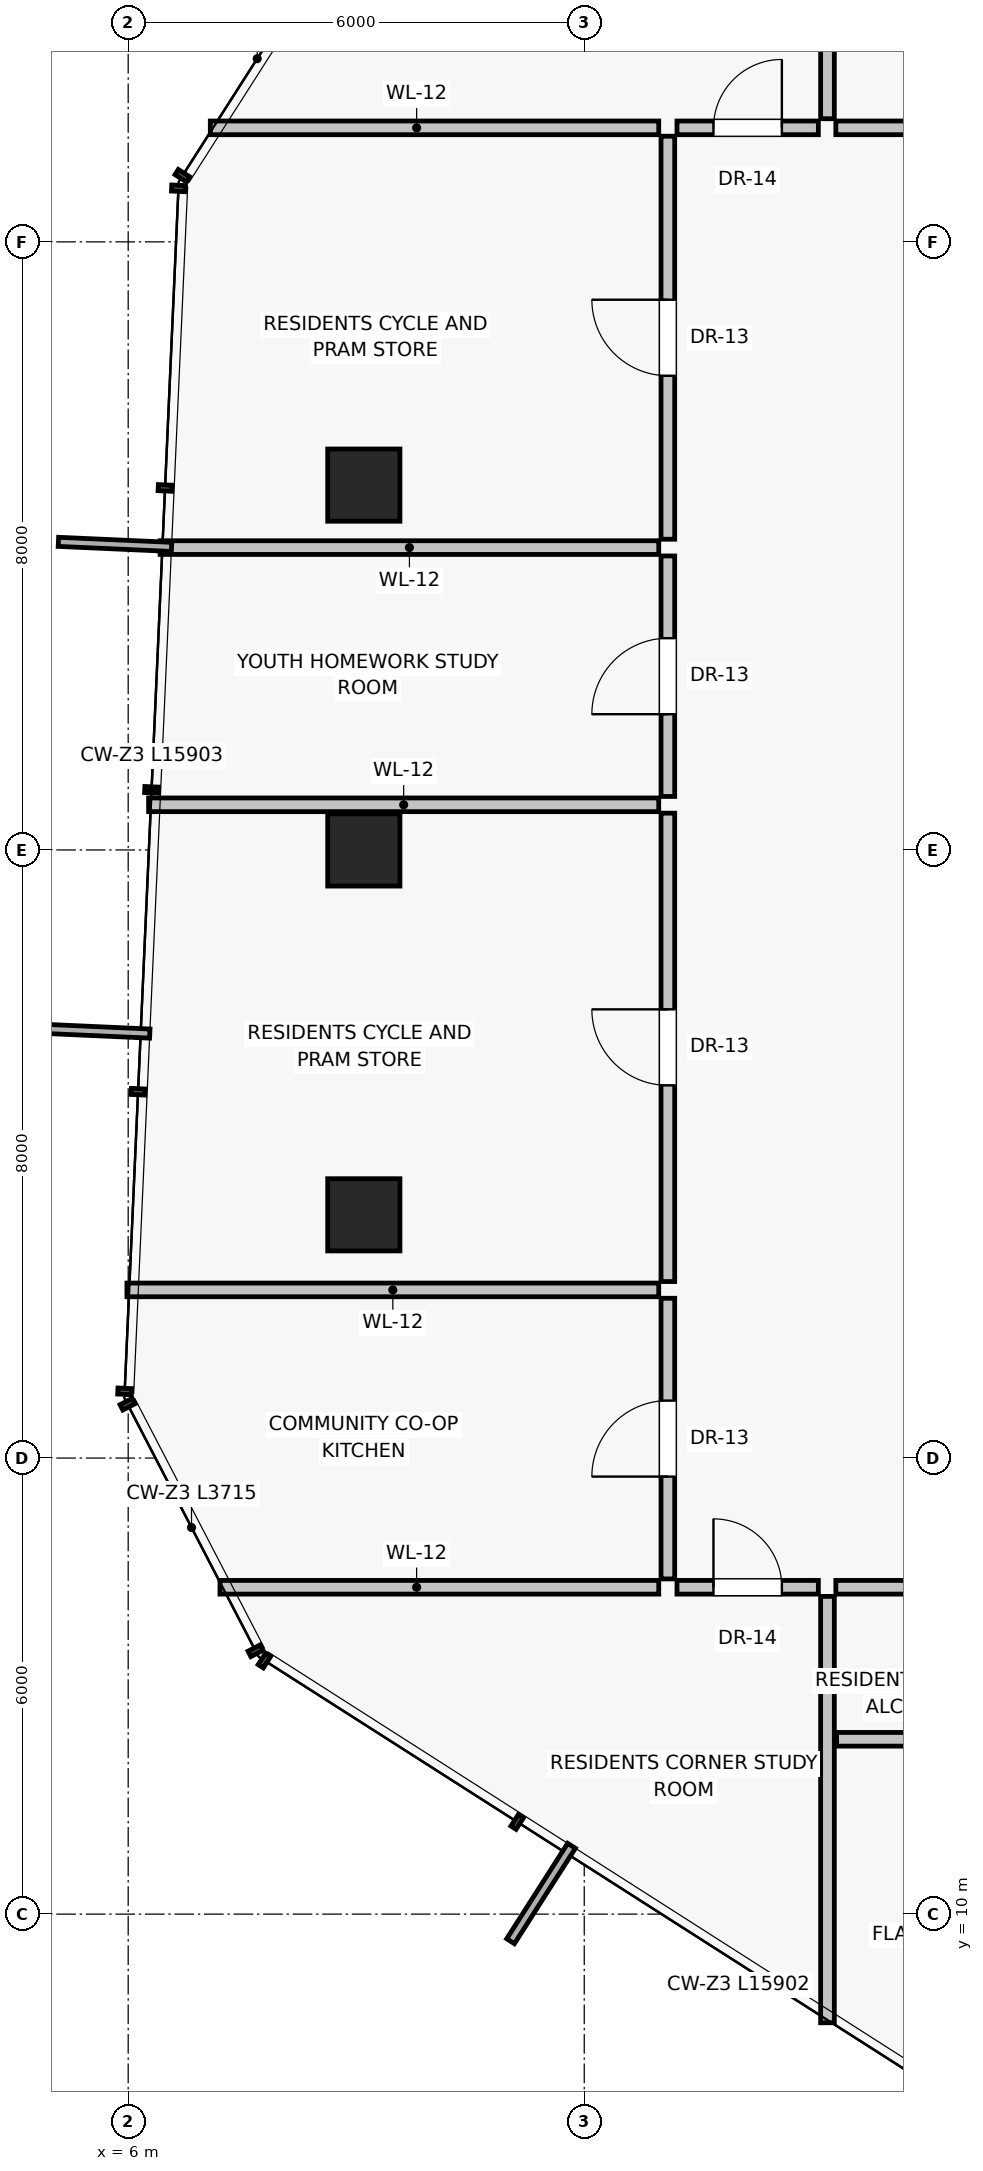
"""IFC4 building model, lengths in metres.
Left out: names, types, materials, properties, quantities, classifications, styles, units other than length and angle.
Written with IfcOpenShell. Run it as: python <this file> out.ifc"""

import sys

from ifc_helpers import new_model, si_unit, direction, frame, frame_2d, origin, origin_2d, place, context, subcontext, project, spatial, rectangle, extrude, source, transform, mapped, element, fill, save


model = new_model("IFC4")
c1 = context("Model", 3, precision=1e-05, world=origin(), true_north=direction((0.0, 1.0)))
c2 = subcontext(c1, "Body", "Model", "MODEL_VIEW")
j1 = project(units=[si_unit("LENGTHUNIT", "METRE"), si_unit("PLANEANGLEUNIT", "RADIAN")], contexts=[c1])
p1 = place(None, origin())
s1 = spatial("IfcSite", under=j1, at=p1, CompositionType="ELEMENT")
p2 = place(p1, origin())
s2 = spatial("IfcBuilding", under=s1, at=p2, CompositionType="ELEMENT")
p3 = place(p2, frame((0.0, 0.0, 215.65)))
s3 = spatial("IfcBuildingStorey", under=s2, at=p3, CompositionType="ELEMENT", Elevation=215.65)
for number, where, z_axis, x_axis in (
    (1, (9.1, 28.8, 0.0), (0.0, 0.0, 1.0), (1.0, 0.0, 0.0)),
    (2, (9.1, 24.0, 0.0), (0.0, 0.0, 1.0), (1.0, 0.0, 0.0)),
    (3, (9.1, 19.2, 0.0), (0.0, 0.0, 1.0), (1.0, 0.0, 0.0)),
):
    element("IfcColumn", number, at=place(p3, frame(where, z_axis=z_axis, x_axis=x_axis)), inside=s3, PredefinedType="COLUMN", context=c2, shape_type="SweptSolid", body=[
        extrude(rectangle(XDim=0.95, YDim=0.95, at=origin_2d()), origin(), (0.0, 0.0, 1.0), 3.25),
    ])
p4 = place(p3, frame((15.2, 14.18, 0.0), z_axis=(0.0, 0.0, 1.0), x_axis=(0.0, -1.0, 0.0)))
e4 = element("IfcWall", 4, at=p4, inside=s3, PredefinedType="PARTITIONING", context=c2, shape_type="SweptSolid", body=[
    extrude(rectangle(XDim=5.609, YDim=0.18, at=frame_2d((2.805, 0.0))), origin(), (0.0, 0.0, 1.0), 3.015),
])
p5 = place(p3, frame((15.31, 14.3, 0.0), z_axis=(0.0, 0.0, 1.0), x_axis=(1.0, 0.0, 0.0)))
e5 = element("IfcWall", 5, at=p5, inside=s3, PredefinedType="PARTITIONING", context=c2, shape_type="SweptSolid", body=[
    extrude(rectangle(XDim=3.78, YDim=0.18, at=frame_2d((1.89, 0.0))), origin(), (0.0, 0.0, 1.0), 3.015),
])
p6 = place(p5, frame((1.39, 0.0, 0.0)))
e6 = element("IfcOpeningElement", 6, at=p6, cuts=e5, PredefinedType="OPENING", context=c2, shape_type="SweptSolid", body=[
    extrude(rectangle(XDim=1.0, YDim=2.01, at=frame_2d((0.5, 1.005))), frame((0.0, 0.1, 0.0), z_axis=(0.0, -1.0, 0.0), x_axis=(1.0, 0.0, 0.0)), (0.0, 0.0, 1.0), 0.2),
])
p7 = place(p3, frame((15.32, 12.3, 0.0), z_axis=(0.0, 0.0, 1.0), x_axis=(1.0, 0.0, 0.0)))
e7 = element("IfcWall", 7, at=p7, inside=s3, PredefinedType="PARTITIONING", context=c2, shape_type="SweptSolid", body=[
    extrude(rectangle(XDim=3.78, YDim=0.18, at=frame_2d((1.89, 0.0))), origin(), (0.0, 0.0, 1.0), 3.015),
])
p8 = place(p3, frame((15.2, 33.62, 0.0), z_axis=(0.0, 0.0, 1.0), x_axis=(0.0, 1.0, 0.0)))
e8 = element("IfcWall", 8, at=p8, inside=s3, PredefinedType="PARTITIONING", context=c2, shape_type="SweptSolid", body=[
    extrude(rectangle(XDim=5.8, YDim=0.18, at=frame_2d((2.9, 0.0))), origin(), (0.0, 0.0, 1.0), 3.015),
])
p9 = place(p3, frame((15.31, 33.5, 0.0), z_axis=(0.0, 0.0, 1.0), x_axis=(1.0, 0.0, 0.0)))
e9 = element("IfcWall", 9, at=p9, inside=s3, PredefinedType="PARTITIONING", context=c2, shape_type="SweptSolid", body=[
    extrude(rectangle(XDim=3.78, YDim=0.18, at=frame_2d((1.89, 0.0))), origin(), (0.0, 0.0, 1.0), 3.015),
])
p10 = place(p9, frame((1.39, 0.0, 0.0)))
e10 = element("IfcOpeningElement", 10, at=p10, cuts=e9, PredefinedType="OPENING", context=c2, shape_type="SweptSolid", body=[
    extrude(rectangle(XDim=1.0, YDim=2.01, at=frame_2d((0.5, 1.005))), frame((0.0, 0.1, 0.0), z_axis=(0.0, -1.0, 0.0), x_axis=(1.0, 0.0, 0.0)), (0.0, 0.0, 1.0), 0.2),
])
p11 = place(p3, frame((12.98, 14.3, 0.0), z_axis=(0.0, 0.0, 1.0), x_axis=(-1.0, 0.0, 0.0)))
e11 = element("IfcWall", 11, at=p11, inside=s3, PredefinedType="PARTITIONING", context=c2, shape_type="SweptSolid", body=[
    extrude(rectangle(XDim=5.772, YDim=0.18, at=frame_2d((2.886, 0.0))), origin(), (0.0, 0.0, 1.0), 3.015),
])
p12 = place(p3, frame((12.98, 33.5, 0.0), z_axis=(0.0, 0.0, 1.0), x_axis=(-1.0, 0.0, 0.0)))
e12 = element("IfcWall", 12, at=p12, inside=s3, PredefinedType="PARTITIONING", context=c2, shape_type="SweptSolid", body=[
    extrude(rectangle(XDim=5.9, YDim=0.18, at=frame_2d((2.95, 0.0))), origin(), (0.0, 0.0, 1.0), 3.015),
])
p13 = place(p3, frame((13.1, 14.41, 0.0), z_axis=(0.0, 0.0, 1.0), x_axis=(0.0, 1.0, 0.0)))
e13 = element("IfcWall", 13, at=p13, inside=s3, PredefinedType="PARTITIONING", context=c2, shape_type="SweptSolid", body=[
    extrude(rectangle(XDim=3.692, YDim=0.18, at=frame_2d((1.846, 0.0))), origin(), (0.0, 0.0, 1.0), 2.662),
])
p14 = place(p13, frame((1.346, 0.0, 0.0)))
e14 = element("IfcOpeningElement", 14, at=p14, cuts=e13, PredefinedType="OPENING", context=c2, shape_type="SweptSolid", body=[
    extrude(rectangle(XDim=1.0, YDim=2.01, at=frame_2d((0.5, 1.005))), frame((0.0, 0.1, 0.0), z_axis=(0.0, -1.0, 0.0), x_axis=(1.0, 0.0, 0.0)), (0.0, 0.0, 1.0), 0.2),
])
p15 = place(p3, frame((13.1, 18.322, 0.0), z_axis=(0.0, 0.0, 1.0), x_axis=(0.0, 1.0, 0.0)))
e15 = element("IfcWall", 15, at=p15, inside=s3, PredefinedType="PARTITIONING", context=c2, shape_type="SweptSolid", body=[
    extrude(rectangle(XDim=6.162, YDim=0.18, at=frame_2d((3.081, 0.0))), origin(), (0.0, 0.0, 1.0), 2.662),
])
p16 = place(p15, frame((2.581, 0.0, 0.0)))
e16 = element("IfcOpeningElement", 16, at=p16, cuts=e15, PredefinedType="OPENING", context=c2, shape_type="SweptSolid", body=[
    extrude(rectangle(XDim=1.0, YDim=2.01, at=frame_2d((0.5, 1.005))), frame((0.0, 0.1, 0.0), z_axis=(0.0, -1.0, 0.0), x_axis=(1.0, 0.0, 0.0)), (0.0, 0.0, 1.0), 0.2),
])
p17 = place(p3, frame((12.98, 18.212, 0.0), z_axis=(0.0, 0.0, 1.0), x_axis=(-1.0, 0.0, 0.0)))
e17 = element("IfcWall", 17, at=p17, inside=s3, PredefinedType="PARTITIONING", context=c2, shape_type="SweptSolid", body=[
    extrude(rectangle(XDim=6.997, YDim=0.18, at=frame_2d((3.498, 0.0))), origin(), (0.0, 0.0, 1.0), 2.469),
])
p18 = place(p3, frame((12.98, 24.594, 0.0), z_axis=(0.0, 0.0, 1.0), x_axis=(-1.0, 0.0, 0.0)))
e18 = element("IfcWall", 18, at=p18, inside=s3, PredefinedType="PARTITIONING", context=c2, shape_type="SweptSolid", body=[
    extrude(rectangle(XDim=6.711, YDim=0.18, at=frame_2d((3.356, 0.0))), origin(), (0.0, 0.0, 1.0), 3.015),
])
p19 = place(p3, frame((13.1, 24.704, 0.0), z_axis=(0.0, 0.0, 1.0), x_axis=(0.0, 1.0, 0.0)))
e19 = element("IfcWall", 19, at=p19, inside=s3, PredefinedType="PARTITIONING", context=c2, shape_type="SweptSolid", body=[
    extrude(rectangle(XDim=3.164, YDim=0.18, at=frame_2d((1.582, 0.0))), origin(), (0.0, 0.0, 1.0), 2.662),
])
p20 = place(p19, frame((1.082, 0.0, 0.0)))
e20 = element("IfcOpeningElement", 20, at=p20, cuts=e19, PredefinedType="OPENING", context=c2, shape_type="SweptSolid", body=[
    extrude(rectangle(XDim=1.0, YDim=2.01, at=frame_2d((0.5, 1.005))), frame((0.0, 0.1, 0.0), z_axis=(0.0, -1.0, 0.0), x_axis=(1.0, 0.0, 0.0)), (0.0, 0.0, 1.0), 0.2),
])
p21 = place(p3, frame((13.1, 28.088, 0.0), z_axis=(0.0, 0.0, 1.0), x_axis=(0.0, 1.0, 0.0)))
e21 = element("IfcWall", 21, at=p21, inside=s3, PredefinedType="PARTITIONING", context=c2, shape_type="SweptSolid", body=[
    extrude(rectangle(XDim=5.302, YDim=0.18, at=frame_2d((2.651, 0.0))), origin(), (0.0, 0.0, 1.0), 2.662),
])
p22 = place(p21, frame((2.151, 0.0, 0.0)))
e22 = element("IfcOpeningElement", 22, at=p22, cuts=e21, PredefinedType="OPENING", context=c2, shape_type="SweptSolid", body=[
    extrude(rectangle(XDim=1.0, YDim=2.01, at=frame_2d((0.5, 1.005))), frame((0.0, 0.1, 0.0), z_axis=(0.0, -1.0, 0.0), x_axis=(1.0, 0.0, 0.0)), (0.0, 0.0, 1.0), 0.2),
])
p23 = place(p3, frame((12.98, 27.978, 0.0), z_axis=(0.0, 0.0, 1.0), x_axis=(-1.0, 0.0, 0.0)))
e23 = element("IfcWall", 23, at=p23, inside=s3, PredefinedType="PARTITIONING", context=c2, shape_type="SweptSolid", body=[
    extrude(rectangle(XDim=6.56, YDim=0.18, at=frame_2d((3.28, 0.0))), origin(), (0.0, 0.0, 1.0), 3.015),
])
p24 = place(p3, frame((13.22, 14.3, 0.0), z_axis=(0.0, 0.0, 1.0), x_axis=(1.0, 0.0, 0.0)))
e24 = element("IfcWall", 24, at=p24, inside=s3, PredefinedType="PARTITIONING", context=c2, shape_type="SweptSolid", body=[
    extrude(rectangle(XDim=1.86, YDim=0.18, at=frame_2d((0.93, 0.0))), origin(), (0.0, 0.0, 1.0), 3.015),
])
p25 = place(p24, frame((0.48, 0.0, 0.0)))
e25 = element("IfcOpeningElement", 25, at=p25, cuts=e24, PredefinedType="OPENING", context=c2, shape_type="SweptSolid", body=[
    extrude(rectangle(XDim=0.9, YDim=2.01, at=frame_2d((0.45, 1.005))), frame((0.0, 0.1, 0.0), z_axis=(0.0, -1.0, 0.0), x_axis=(1.0, 0.0, 0.0)), (0.0, 0.0, 1.0), 0.2),
])
p26 = place(p3, frame((13.22, 33.5, 0.0), z_axis=(0.0, 0.0, 1.0), x_axis=(1.0, 0.0, 0.0)))
e26 = element("IfcWall", 26, at=p26, inside=s3, PredefinedType="PARTITIONING", context=c2, shape_type="SweptSolid", body=[
    extrude(rectangle(XDim=1.86, YDim=0.18, at=frame_2d((0.93, 0.0))), origin(), (0.0, 0.0, 1.0), 3.015),
])
p27 = place(p26, frame((0.48, 0.0, 0.0)))
e27 = element("IfcOpeningElement", 27, at=p27, cuts=e26, PredefinedType="OPENING", context=c2, shape_type="SweptSolid", body=[
    extrude(rectangle(XDim=0.9, YDim=2.01, at=frame_2d((0.45, 1.005))), frame((0.0, 0.1, 0.0), z_axis=(0.0, -1.0, 0.0), x_axis=(1.0, 0.0, 0.0)), (0.0, 0.0, 1.0), 0.2),
])
m1 = source(origin(), c2, "Body", "SweptSolid", [
    extrude(rectangle(XDim=1.0, YDim=2.01, at=frame_2d((0.5, 1.005))), frame((0.0, 0.025, 0.0), z_axis=(0.0, -1.0, 0.0), x_axis=(1.0, 0.0, 0.0)), (0.0, 0.0, 1.0), 0.05),
])
p28 = place(p14, origin())
e28 = element("IfcDoor", 28, at=p28, inside=s3, OperationType="SINGLE_SWING_LEFT", PredefinedType="DOOR", context=c2, shape_type="MappedRepresentation", body=[
    mapped(m1, transform((0.0, 0.0, 0.0), scale=1.0)),
])
fill(e14, e28)
p29 = place(p16, origin())
e29 = element("IfcDoor", 29, at=p29, inside=s3, OperationType="SINGLE_SWING_RIGHT", PredefinedType="DOOR", context=c2, shape_type="MappedRepresentation", body=[
    mapped(m1, transform((0.0, 0.0, 0.0), scale=1.0)),
])
fill(e16, e29)
p30 = place(p20, origin())
e30 = element("IfcDoor", 30, at=p30, inside=s3, OperationType="SINGLE_SWING_LEFT", PredefinedType="DOOR", context=c2, shape_type="MappedRepresentation", body=[
    mapped(m1, transform((0.0, 0.0, 0.0), scale=1.0)),
])
fill(e20, e30)
p31 = place(p22, origin())
e31 = element("IfcDoor", 31, at=p31, inside=s3, OperationType="SINGLE_SWING_RIGHT", PredefinedType="DOOR", context=c2, shape_type="MappedRepresentation", body=[
    mapped(m1, transform((0.0, 0.0, 0.0), scale=1.0)),
])
fill(e22, e31)
m2 = source(origin(), c2, "Body", "SweptSolid", [
    extrude(rectangle(XDim=0.9, YDim=2.01, at=frame_2d((0.45, 1.005))), frame((0.0, 0.025, 0.0), z_axis=(0.0, -1.0, 0.0), x_axis=(1.0, 0.0, 0.0)), (0.0, 0.0, 1.0), 0.05),
])
p32 = place(p25, origin())
e32 = element("IfcDoor", 32, at=p32, inside=s3, OperationType="SINGLE_SWING_LEFT", PredefinedType="DOOR", context=c2, shape_type="MappedRepresentation", body=[
    mapped(m2, transform((0.0, 0.0, 0.0), scale=1.0)),
])
fill(e25, e32)
p33 = place(p27, origin())
e33 = element("IfcDoor", 33, at=p33, inside=s3, OperationType="SINGLE_SWING_RIGHT", PredefinedType="DOOR", context=c2, shape_type="MappedRepresentation", body=[
    mapped(m2, transform((0.0, 0.0, 0.0), scale=1.0)),
])
fill(e27, e33)
save(model, sys.argv[1])
